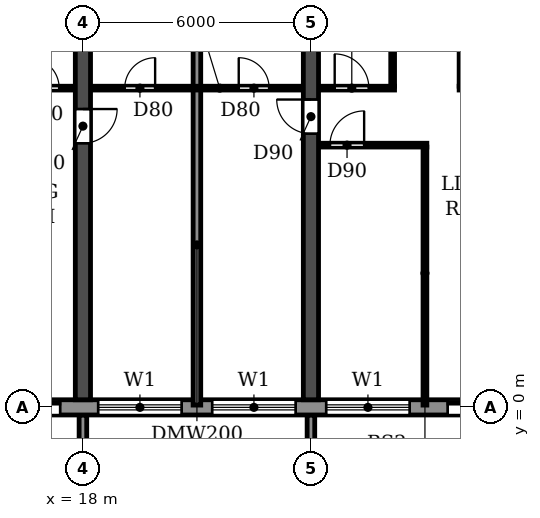
"""IFC4 building model, lengths in metres.
Left out: names, types, materials, properties, quantities, classifications, styles, units other than length and angle.
Written with IfcOpenShell. Run it as: python <this file> out.ifc"""

import sys

from ifc_helpers import new_model, si_unit, direction, frame, frame_2d, origin, place, context, subcontext, project, spatial, polyline, rectangle, outline, extrude, source, transform, mapped, element, fill, save


model = new_model("IFC4")
c1 = context("Model", 3, precision=1e-05, world=origin(), true_north=direction((0.0, 1.0)))
c2 = subcontext(c1, "Body", "Model", "MODEL_VIEW")
j1 = project(units=[si_unit("LENGTHUNIT", "METRE"), si_unit("PLANEANGLEUNIT", "RADIAN")], contexts=[c1])
p1 = place(None, origin())
s1 = spatial("IfcSite", under=j1, at=p1, CompositionType="ELEMENT")
p2 = place(p1, origin())
s2 = spatial("IfcBuilding", under=s1, at=p2, CompositionType="ELEMENT")
p3 = place(p2, frame((0.0, 0.0, 63.0)))
s3 = spatial("IfcBuildingStorey", under=s2, at=p3, CompositionType="ELEMENT", Elevation=63.0)
p4 = place(p3, frame((18.0, 0.2, 0.0), z_axis=(0.0, 0.0, 1.0), x_axis=(0.0, 1.0, 0.0)))
e1 = element("IfcWall", 1, at=p4, inside=s3, PredefinedType="SHEAR", context=c2, shape_type="SweptSolid", body=[
    extrude(rectangle(XDim=11.65, YDim=0.4, at=frame_2d((5.825, 0.0))), origin(), (0.0, 0.0, 1.0), 2.95),
])
p5 = place(p4, frame((6.75, 0.0, 0.0)))
e2 = element("IfcOpeningElement", 2, at=p5, cuts=e1, PredefinedType="OPENING", context=c2, shape_type="SweptSolid", body=[
    extrude(rectangle(XDim=0.9, YDim=2.1, at=frame_2d((0.45, 1.05))), frame((0.0, 0.21, 0.0), z_axis=(0.0, -1.0, 0.0), x_axis=(1.0, 0.0, 0.0)), (0.0, 0.0, 1.0), 0.42),
])
p6 = place(p3, frame((24.0, 0.2, 0.0), z_axis=(0.0, 0.0, 1.0), x_axis=(0.0, 1.0, 0.0)))
e3 = element("IfcWall", 3, at=p6, inside=s3, PredefinedType="SHEAR", context=c2, shape_type="SweptSolid", body=[
    extrude(rectangle(XDim=11.65, YDim=0.4, at=frame_2d((5.825, 0.0))), origin(), (0.0, 0.0, 1.0), 2.95),
])
p7 = place(p6, frame((7.0, 0.0, 0.0)))
e4 = element("IfcOpeningElement", 4, at=p7, cuts=e3, PredefinedType="OPENING", context=c2, shape_type="SweptSolid", body=[
    extrude(rectangle(XDim=0.9, YDim=2.1, at=frame_2d((0.45, 1.05))), frame((0.0, 0.21, 0.0), z_axis=(0.0, -1.0, 0.0), x_axis=(1.0, 0.0, 0.0)), (0.0, 0.0, 1.0), 0.42),
])
p8 = place(p3, frame((10.683, 0.0, 0.0), z_axis=(0.0, 0.0, 1.0), x_axis=(1.0, 0.0, 0.0)))
e5 = element("IfcWall", 5, at=p8, inside=s3, PredefinedType="STANDARD", context=c2, shape_type="SweptSolid", body=[
    extrude(rectangle(XDim=80.634, YDim=0.4, at=frame_2d((40.317, 0.0))), origin(), (0.0, 0.0, 1.0), 2.95),
])
p9 = place(p8, frame((1.717, 0.0, 0.9)))
e6 = element("IfcOpeningElement", 6, at=p9, cuts=e5, PredefinedType="OPENING", context=c2, shape_type="SweptSolid", body=[
    extrude(rectangle(XDim=2.2, YDim=1.5, at=frame_2d((1.1, 0.75))), frame((0.0, 0.21, 0.0), z_axis=(0.0, -1.0, 0.0), x_axis=(1.0, 0.0, 0.0)), (0.0, 0.0, 1.0), 0.42),
])
p10 = place(p8, frame((4.917, 0.0, 0.0)))
e7 = element("IfcOpeningElement", 7, at=p10, cuts=e5, PredefinedType="OPENING", context=c2, shape_type="SweptSolid", body=[
    extrude(rectangle(XDim=1.8, YDim=2.4, at=frame_2d((0.9, 1.2))), frame((0.0, 0.21, 0.0), z_axis=(0.0, -1.0, 0.0), x_axis=(1.0, 0.0, 0.0)), (0.0, 0.0, 1.0), 0.42),
])
p11 = place(p8, frame((7.717, 0.0, 0.9)))
e8 = element("IfcOpeningElement", 8, at=p11, cuts=e5, PredefinedType="OPENING", context=c2, shape_type="SweptSolid", body=[
    extrude(rectangle(XDim=2.2, YDim=1.5, at=frame_2d((1.1, 0.75))), frame((0.0, 0.21, 0.0), z_axis=(0.0, -1.0, 0.0), x_axis=(1.0, 0.0, 0.0)), (0.0, 0.0, 1.0), 0.42),
])
p12 = place(p8, frame((10.717, 0.0, 0.9)))
e9 = element("IfcOpeningElement", 9, at=p12, cuts=e5, PredefinedType="OPENING", context=c2, shape_type="SweptSolid", body=[
    extrude(rectangle(XDim=2.2, YDim=1.5, at=frame_2d((1.1, 0.75))), frame((0.0, 0.21, 0.0), z_axis=(0.0, -1.0, 0.0), x_axis=(1.0, 0.0, 0.0)), (0.0, 0.0, 1.0), 0.42),
])
p13 = place(p8, frame((13.717, 0.0, 0.9)))
e10 = element("IfcOpeningElement", 10, at=p13, cuts=e5, PredefinedType="OPENING", context=c2, shape_type="SweptSolid", body=[
    extrude(rectangle(XDim=2.2, YDim=1.5, at=frame_2d((1.1, 0.75))), frame((0.0, 0.21, 0.0), z_axis=(0.0, -1.0, 0.0), x_axis=(1.0, 0.0, 0.0)), (0.0, 0.0, 1.0), 0.42),
])
p14 = place(p8, frame((16.917, 0.0, 0.0)))
e11 = element("IfcOpeningElement", 11, at=p14, cuts=e5, PredefinedType="OPENING", context=c2, shape_type="SweptSolid", body=[
    extrude(rectangle(XDim=1.8, YDim=2.4, at=frame_2d((0.9, 1.2))), frame((0.0, 0.21, 0.0), z_axis=(0.0, -1.0, 0.0), x_axis=(1.0, 0.0, 0.0)), (0.0, 0.0, 1.0), 0.42),
])
p15 = place(p8, frame((19.717, 0.0, 0.9)))
e12 = element("IfcOpeningElement", 12, at=p15, cuts=e5, PredefinedType="OPENING", context=c2, shape_type="SweptSolid", body=[
    extrude(rectangle(XDim=2.2, YDim=1.5, at=frame_2d((1.1, 0.75))), frame((0.0, 0.21, 0.0), z_axis=(0.0, -1.0, 0.0), x_axis=(1.0, 0.0, 0.0)), (0.0, 0.0, 1.0), 0.42),
])
p16 = place(p8, frame((22.717, 0.0, 0.9)))
e13 = element("IfcOpeningElement", 13, at=p16, cuts=e5, PredefinedType="OPENING", context=c2, shape_type="SweptSolid", body=[
    extrude(rectangle(XDim=2.2, YDim=1.5, at=frame_2d((1.1, 0.75))), frame((0.0, 0.21, 0.0), z_axis=(0.0, -1.0, 0.0), x_axis=(1.0, 0.0, 0.0)), (0.0, 0.0, 1.0), 0.42),
])
p17 = place(p8, frame((25.917, 0.0, 0.0)))
e14 = element("IfcOpeningElement", 14, at=p17, cuts=e5, PredefinedType="OPENING", context=c2, shape_type="SweptSolid", body=[
    extrude(rectangle(XDim=1.8, YDim=2.4, at=frame_2d((0.9, 1.2))), frame((0.0, 0.21, 0.0), z_axis=(0.0, -1.0, 0.0), x_axis=(1.0, 0.0, 0.0)), (0.0, 0.0, 1.0), 0.42),
])
p18 = place(p8, frame((28.717, 0.0, 0.9)))
e15 = element("IfcOpeningElement", 15, at=p18, cuts=e5, PredefinedType="OPENING", context=c2, shape_type="SweptSolid", body=[
    extrude(rectangle(XDim=2.2, YDim=1.5, at=frame_2d((1.1, 0.75))), frame((0.0, 0.21, 0.0), z_axis=(0.0, -1.0, 0.0), x_axis=(1.0, 0.0, 0.0)), (0.0, 0.0, 1.0), 0.42),
])
p19 = place(p8, frame((31.717, 0.0, 0.9)))
e16 = element("IfcOpeningElement", 16, at=p19, cuts=e5, PredefinedType="OPENING", context=c2, shape_type="SweptSolid", body=[
    extrude(rectangle(XDim=2.2, YDim=1.5, at=frame_2d((1.1, 0.75))), frame((0.0, 0.21, 0.0), z_axis=(0.0, -1.0, 0.0), x_axis=(1.0, 0.0, 0.0)), (0.0, 0.0, 1.0), 0.42),
])
p20 = place(p8, frame((34.717, 0.0, 0.9)))
e17 = element("IfcOpeningElement", 17, at=p20, cuts=e5, PredefinedType="OPENING", context=c2, shape_type="SweptSolid", body=[
    extrude(rectangle(XDim=2.2, YDim=1.5, at=frame_2d((1.1, 0.75))), frame((0.0, 0.21, 0.0), z_axis=(0.0, -1.0, 0.0), x_axis=(1.0, 0.0, 0.0)), (0.0, 0.0, 1.0), 0.42),
])
p21 = place(p8, frame((37.717, 0.0, 0.9)))
e18 = element("IfcOpeningElement", 18, at=p21, cuts=e5, PredefinedType="OPENING", context=c2, shape_type="SweptSolid", body=[
    extrude(rectangle(XDim=2.2, YDim=1.5, at=frame_2d((1.1, 0.75))), frame((0.0, 0.21, 0.0), z_axis=(0.0, -1.0, 0.0), x_axis=(1.0, 0.0, 0.0)), (0.0, 0.0, 1.0), 0.42),
])
p22 = place(p8, frame((40.917, 0.0, 0.0)))
e19 = element("IfcOpeningElement", 19, at=p22, cuts=e5, PredefinedType="OPENING", context=c2, shape_type="SweptSolid", body=[
    extrude(rectangle(XDim=1.8, YDim=2.4, at=frame_2d((0.9, 1.2))), frame((0.0, 0.21, 0.0), z_axis=(0.0, -1.0, 0.0), x_axis=(1.0, 0.0, 0.0)), (0.0, 0.0, 1.0), 0.42),
])
p23 = place(p8, frame((43.717, 0.0, 0.9)))
e20 = element("IfcOpeningElement", 20, at=p23, cuts=e5, PredefinedType="OPENING", context=c2, shape_type="SweptSolid", body=[
    extrude(rectangle(XDim=2.2, YDim=1.5, at=frame_2d((1.1, 0.75))), frame((0.0, 0.21, 0.0), z_axis=(0.0, -1.0, 0.0), x_axis=(1.0, 0.0, 0.0)), (0.0, 0.0, 1.0), 0.42),
])
p24 = place(p8, frame((46.717, 0.0, 0.9)))
e21 = element("IfcOpeningElement", 21, at=p24, cuts=e5, PredefinedType="OPENING", context=c2, shape_type="SweptSolid", body=[
    extrude(rectangle(XDim=2.2, YDim=1.5, at=frame_2d((1.1, 0.75))), frame((0.0, 0.21, 0.0), z_axis=(0.0, -1.0, 0.0), x_axis=(1.0, 0.0, 0.0)), (0.0, 0.0, 1.0), 0.42),
])
p25 = place(p8, frame((49.717, 0.0, 0.9)))
e22 = element("IfcOpeningElement", 22, at=p25, cuts=e5, PredefinedType="OPENING", context=c2, shape_type="SweptSolid", body=[
    extrude(rectangle(XDim=2.2, YDim=1.5, at=frame_2d((1.1, 0.75))), frame((0.0, 0.21, 0.0), z_axis=(0.0, -1.0, 0.0), x_axis=(1.0, 0.0, 0.0)), (0.0, 0.0, 1.0), 0.42),
])
p26 = place(p8, frame((52.717, 0.0, 0.9)))
e23 = element("IfcOpeningElement", 23, at=p26, cuts=e5, PredefinedType="OPENING", context=c2, shape_type="SweptSolid", body=[
    extrude(rectangle(XDim=2.2, YDim=1.5, at=frame_2d((1.1, 0.75))), frame((0.0, 0.21, 0.0), z_axis=(0.0, -1.0, 0.0), x_axis=(1.0, 0.0, 0.0)), (0.0, 0.0, 1.0), 0.42),
])
p27 = place(p8, frame((55.717, 0.0, 0.9)))
e24 = element("IfcOpeningElement", 24, at=p27, cuts=e5, PredefinedType="OPENING", context=c2, shape_type="SweptSolid", body=[
    extrude(rectangle(XDim=2.2, YDim=1.5, at=frame_2d((1.1, 0.75))), frame((0.0, 0.21, 0.0), z_axis=(0.0, -1.0, 0.0), x_axis=(1.0, 0.0, 0.0)), (0.0, 0.0, 1.0), 0.42),
])
p28 = place(p8, frame((58.717, 0.0, 0.9)))
e25 = element("IfcOpeningElement", 25, at=p28, cuts=e5, PredefinedType="OPENING", context=c2, shape_type="SweptSolid", body=[
    extrude(rectangle(XDim=2.2, YDim=1.5, at=frame_2d((1.1, 0.75))), frame((0.0, 0.21, 0.0), z_axis=(0.0, -1.0, 0.0), x_axis=(1.0, 0.0, 0.0)), (0.0, 0.0, 1.0), 0.42),
])
p29 = place(p8, frame((61.717, 0.0, 0.9)))
e26 = element("IfcOpeningElement", 26, at=p29, cuts=e5, PredefinedType="OPENING", context=c2, shape_type="SweptSolid", body=[
    extrude(rectangle(XDim=2.2, YDim=1.5, at=frame_2d((1.1, 0.75))), frame((0.0, 0.21, 0.0), z_axis=(0.0, -1.0, 0.0), x_axis=(1.0, 0.0, 0.0)), (0.0, 0.0, 1.0), 0.42),
])
p30 = place(p8, frame((64.917, 0.0, 0.0)))
e27 = element("IfcOpeningElement", 27, at=p30, cuts=e5, PredefinedType="OPENING", context=c2, shape_type="SweptSolid", body=[
    extrude(rectangle(XDim=1.8, YDim=2.4, at=frame_2d((0.9, 1.2))), frame((0.0, 0.21, 0.0), z_axis=(0.0, -1.0, 0.0), x_axis=(1.0, 0.0, 0.0)), (0.0, 0.0, 1.0), 0.42),
])
p31 = place(p8, frame((67.717, 0.0, 0.9)))
e28 = element("IfcOpeningElement", 28, at=p31, cuts=e5, PredefinedType="OPENING", context=c2, shape_type="SweptSolid", body=[
    extrude(rectangle(XDim=2.2, YDim=1.5, at=frame_2d((1.1, 0.75))), frame((0.0, 0.21, 0.0), z_axis=(0.0, -1.0, 0.0), x_axis=(1.0, 0.0, 0.0)), (0.0, 0.0, 1.0), 0.42),
])
p32 = place(p8, frame((70.717, 0.0, 0.9)))
e29 = element("IfcOpeningElement", 29, at=p32, cuts=e5, PredefinedType="OPENING", context=c2, shape_type="SweptSolid", body=[
    extrude(rectangle(XDim=2.2, YDim=1.5, at=frame_2d((1.1, 0.75))), frame((0.0, 0.21, 0.0), z_axis=(0.0, -1.0, 0.0), x_axis=(1.0, 0.0, 0.0)), (0.0, 0.0, 1.0), 0.42),
])
p33 = place(p8, frame((73.717, 0.0, 0.9)))
e30 = element("IfcOpeningElement", 30, at=p33, cuts=e5, PredefinedType="OPENING", context=c2, shape_type="SweptSolid", body=[
    extrude(rectangle(XDim=2.2, YDim=1.5, at=frame_2d((1.1, 0.75))), frame((0.0, 0.21, 0.0), z_axis=(0.0, -1.0, 0.0), x_axis=(1.0, 0.0, 0.0)), (0.0, 0.0, 1.0), 0.42),
])
p34 = place(p8, frame((76.917, 0.0, 0.0)))
e31 = element("IfcOpeningElement", 31, at=p34, cuts=e5, PredefinedType="OPENING", context=c2, shape_type="SweptSolid", body=[
    extrude(rectangle(XDim=1.8, YDim=2.4, at=frame_2d((0.9, 1.2))), frame((0.0, 0.21, 0.0), z_axis=(0.0, -1.0, 0.0), x_axis=(1.0, 0.0, 0.0)), (0.0, 0.0, 1.0), 0.42),
])
m1 = source(origin(), c2, "Body", "SweptSolid", [
    extrude(outline(polyline([(0.0, 0.0), (0.2, 0.0), (0.2, 1.65), (0.0, 1.65), (0.0, 0.0)])), origin(), (0.0, 0.0, 1.0), 3.1),
])
for number, where in (
    (32, (17.9, -1.85, 0.0)),
    (33, (23.9, -1.85, 0.0)),
):
    element("IfcWall", number, at=place(p3, frame(where)), inside=s3, PredefinedType="STANDARD", context=c2, shape_type="MappedRepresentation", body=[
        mapped(m1, transform((0.0, 0.0, 0.0))),
    ])
p35 = place(p3, frame((21.0, 0.06, 0.0), z_axis=(0.0, 0.0, 1.0), x_axis=(0.0, 1.0, 0.0)))
e34 = element("IfcWall", 34, at=p35, inside=s3, PredefinedType="PARTITIONING", context=c2, shape_type="SweptSolid", body=[
    extrude(rectangle(XDim=11.78, YDim=0.2, at=frame_2d((5.89, 0.0))), origin(), (0.0, 0.0, 1.0), 2.95),
])
p36 = place(p3, frame((24.21, 6.9, 0.0), z_axis=(0.0, 0.0, 1.0), x_axis=(1.0, 0.0, 0.0)))
e35 = element("IfcWall", 35, at=p36, inside=s3, PredefinedType="PARTITIONING", context=c2, shape_type="SweptSolid", body=[
    extrude(rectangle(XDim=2.84, YDim=0.1, at=frame_2d((1.42, 0.0))), origin(), (0.0, 0.0, 1.0), 2.95),
])
p37 = place(p36, frame((0.29, 0.0, 0.0)))
e36 = element("IfcOpeningElement", 36, at=p37, cuts=e35, PredefinedType="OPENING", context=c2, shape_type="SweptSolid", body=[
    extrude(rectangle(XDim=0.9, YDim=2.1, at=frame_2d((0.45, 1.05))), frame((0.0, 0.06, 0.0), z_axis=(0.0, -1.0, 0.0), x_axis=(1.0, 0.0, 0.0)), (0.0, 0.0, 1.0), 0.12),
])
p38 = place(p3, frame((15.9, 8.4, 0.0), z_axis=(0.0, 0.0, 1.0), x_axis=(1.0, 0.0, 0.0)))
e37 = element("IfcWall", 37, at=p38, inside=s3, PredefinedType="PARTITIONING", context=c2, shape_type="SweptSolid", body=[
    extrude(rectangle(XDim=1.89, YDim=0.1, at=frame_2d((0.945, 0.0))), origin(), (0.0, 0.0, 1.0), 2.95),
])
p39 = place(p38, frame((0.675, 0.0, 0.0)))
e38 = element("IfcOpeningElement", 38, at=p39, cuts=e37, PredefinedType="OPENING", context=c2, shape_type="SweptSolid", body=[
    extrude(rectangle(XDim=0.8, YDim=2.1, at=frame_2d((0.4, 1.05))), frame((0.0, 0.06, 0.0), z_axis=(0.0, -1.0, 0.0), x_axis=(1.0, 0.0, 0.0)), (0.0, 0.0, 1.0), 0.12),
])
p40 = place(p3, frame((18.21, 8.4, 0.0), z_axis=(0.0, 0.0, 1.0), x_axis=(1.0, 0.0, 0.0)))
e39 = element("IfcWall", 39, at=p40, inside=s3, PredefinedType="PARTITIONING", context=c2, shape_type="SweptSolid", body=[
    extrude(rectangle(XDim=5.58, YDim=0.1, at=frame_2d((2.79, 0.0))), origin(), (0.0, 0.0, 1.0), 2.95),
])
p41 = place(p40, frame((0.89, 0.0, 0.0)))
e40 = element("IfcOpeningElement", 40, at=p41, cuts=e39, PredefinedType="OPENING", context=c2, shape_type="SweptSolid", body=[
    extrude(rectangle(XDim=0.8, YDim=2.1, at=frame_2d((0.4, 1.05))), frame((0.0, 0.06, 0.0), z_axis=(0.0, -1.0, 0.0), x_axis=(1.0, 0.0, 0.0)), (0.0, 0.0, 1.0), 0.12),
])
p42 = place(p40, frame((3.89, 0.0, 0.0)))
e41 = element("IfcOpeningElement", 41, at=p42, cuts=e39, PredefinedType="OPENING", context=c2, shape_type="SweptSolid", body=[
    extrude(rectangle(XDim=0.8, YDim=2.1, at=frame_2d((0.4, 1.05))), frame((0.0, 0.06, 0.0), z_axis=(0.0, -1.0, 0.0), x_axis=(1.0, 0.0, 0.0)), (0.0, 0.0, 1.0), 0.12),
])
p43 = place(p3, frame((24.21, 8.4, 0.0), z_axis=(0.0, 0.0, 1.0), x_axis=(1.0, 0.0, 0.0)))
e42 = element("IfcWall", 42, at=p43, inside=s3, PredefinedType="PARTITIONING", context=c2, shape_type="SweptSolid", body=[
    extrude(rectangle(XDim=1.99, YDim=0.1, at=frame_2d((0.995, 0.0))), origin(), (0.0, 0.0, 1.0), 2.95),
])
p44 = place(p43, frame((0.415, 0.0, 0.0)))
e43 = element("IfcOpeningElement", 43, at=p44, cuts=e42, PredefinedType="OPENING", context=c2, shape_type="SweptSolid", body=[
    extrude(rectangle(XDim=0.9, YDim=2.1, at=frame_2d((0.45, 1.05))), frame((0.0, 0.06, 0.0), z_axis=(0.0, -1.0, 0.0), x_axis=(1.0, 0.0, 0.0)), (0.0, 0.0, 1.0), 0.12),
])
p45 = place(p3, frame((27.9, 8.4, 0.0), z_axis=(0.0, 0.0, 1.0), x_axis=(1.0, 0.0, 0.0)))
e44 = element("IfcWall", 44, at=p45, inside=s3, PredefinedType="PARTITIONING", context=c2, shape_type="SweptSolid", body=[
    extrude(rectangle(XDim=1.89, YDim=0.1, at=frame_2d((0.945, 0.0))), origin(), (0.0, 0.0, 1.0), 2.95),
])
p46 = place(p45, frame((0.675, 0.0, 0.0)))
e45 = element("IfcOpeningElement", 45, at=p46, cuts=e44, PredefinedType="OPENING", context=c2, shape_type="SweptSolid", body=[
    extrude(rectangle(XDim=0.8, YDim=2.1, at=frame_2d((0.4, 1.05))), frame((0.0, 0.06, 0.0), z_axis=(0.0, -1.0, 0.0), x_axis=(1.0, 0.0, 0.0)), (0.0, 0.0, 1.0), 0.12),
])
p47 = place(p3, frame((26.15, 8.45, 0.0), z_axis=(0.0, 0.0, 1.0), x_axis=(0.0, 1.0, 0.0)))
e46 = element("IfcWall", 46, at=p47, inside=s3, PredefinedType="PARTITIONING", context=c2, shape_type="SweptSolid", body=[
    extrude(rectangle(XDim=3.39, YDim=0.1, at=frame_2d((1.695, 0.0))), origin(), (0.0, 0.0, 1.0), 2.95),
])
p48 = place(p3, frame((27.0, 0.06, 0.0), z_axis=(0.0, 0.0, 1.0), x_axis=(0.0, 1.0, 0.0)))
e47 = element("IfcWall", 47, at=p48, inside=s3, PredefinedType="PARTITIONING", context=c2, shape_type="SweptSolid", body=[
    extrude(rectangle(XDim=6.79, YDim=0.1, at=frame_2d((3.395, 0.0))), origin(), (0.0, 0.0, 1.0), 2.95),
])
p49 = place(p3, frame((27.95, 8.45, 0.0), z_axis=(0.0, 0.0, 1.0), x_axis=(0.0, 1.0, 0.0)))
e48 = element("IfcWall", 48, at=p49, inside=s3, PredefinedType="PARTITIONING", context=c2, shape_type="SweptSolid", body=[
    extrude(rectangle(XDim=3.39, YDim=0.1, at=frame_2d((1.695, 0.0))), origin(), (0.0, 0.0, 1.0), 2.95),
])
p50 = place(p10, origin())
e49 = element("IfcDoor", 49, at=p50, inside=s3, OperationType="DOUBLE_DOOR_SLIDING", PredefinedType="DOOR", context=c2, shape_type="SweptSolid", body=[
    extrude(rectangle(XDim=1.8, YDim=2.4, at=frame_2d((0.9, 1.2))), frame((0.0, 0.025, 0.0), z_axis=(0.0, -1.0, 0.0), x_axis=(1.0, 0.0, 0.0)), (0.0, 0.0, 1.0), 0.05),
])
fill(e7, e49)
p51 = place(p11, origin())
e50 = element("IfcWindow", 50, at=p51, inside=s3, PartitioningType="DOUBLE_PANEL_HORIZONTAL", PredefinedType="WINDOW", context=c2, shape_type="SweptSolid", body=[
    extrude(rectangle(XDim=2.2, YDim=1.5, at=frame_2d((1.1, 0.75))), frame((0.0, 0.03, 0.0), z_axis=(0.0, -1.0, 0.0), x_axis=(1.0, 0.0, 0.0)), (0.0, 0.0, 1.0), 0.06),
])
fill(e8, e50)
p52 = place(p12, origin())
e51 = element("IfcWindow", 51, at=p52, inside=s3, PartitioningType="DOUBLE_PANEL_HORIZONTAL", PredefinedType="WINDOW", context=c2, shape_type="SweptSolid", body=[
    extrude(rectangle(XDim=2.2, YDim=1.5, at=frame_2d((1.1, 0.75))), frame((0.0, 0.03, 0.0), z_axis=(0.0, -1.0, 0.0), x_axis=(1.0, 0.0, 0.0)), (0.0, 0.0, 1.0), 0.06),
])
fill(e9, e51)
p53 = place(p13, origin())
e52 = element("IfcWindow", 52, at=p53, inside=s3, PartitioningType="DOUBLE_PANEL_HORIZONTAL", PredefinedType="WINDOW", context=c2, shape_type="SweptSolid", body=[
    extrude(rectangle(XDim=2.2, YDim=1.5, at=frame_2d((1.1, 0.75))), frame((0.0, 0.03, 0.0), z_axis=(0.0, -1.0, 0.0), x_axis=(1.0, 0.0, 0.0)), (0.0, 0.0, 1.0), 0.06),
])
fill(e10, e52)
p54 = place(p14, origin())
e53 = element("IfcDoor", 53, at=p54, inside=s3, OperationType="DOUBLE_DOOR_SLIDING", PredefinedType="DOOR", context=c2, shape_type="SweptSolid", body=[
    extrude(rectangle(XDim=1.8, YDim=2.4, at=frame_2d((0.9, 1.2))), frame((0.0, 0.025, 0.0), z_axis=(0.0, -1.0, 0.0), x_axis=(1.0, 0.0, 0.0)), (0.0, 0.0, 1.0), 0.05),
])
fill(e11, e53)
p55 = place(p41, origin())
e54 = element("IfcDoor", 54, at=p55, inside=s3, OperationType="SINGLE_SWING_RIGHT", PredefinedType="DOOR", context=c2, shape_type="SweptSolid", body=[
    extrude(rectangle(XDim=0.8, YDim=2.1, at=frame_2d((0.4, 1.05))), frame((0.0, 0.025, 0.0), z_axis=(0.0, -1.0, 0.0), x_axis=(1.0, 0.0, 0.0)), (0.0, 0.0, 1.0), 0.05),
])
fill(e40, e54)
p56 = place(p39, origin())
e55 = element("IfcDoor", 55, at=p56, inside=s3, OperationType="SINGLE_SWING_LEFT", PredefinedType="DOOR", context=c2, shape_type="SweptSolid", body=[
    extrude(rectangle(XDim=0.8, YDim=2.1, at=frame_2d((0.4, 1.05))), frame((0.0, 0.025, 0.0), z_axis=(0.0, -1.0, 0.0), x_axis=(1.0, 0.0, 0.0)), (0.0, 0.0, 1.0), 0.05),
])
fill(e38, e55)
p57 = place(p5, frame((0.9, 0.0, 0.0), z_axis=(0.0, 0.0, 1.0), x_axis=(-1.0, 0.0, 0.0)))
e56 = element("IfcDoor", 56, at=p57, inside=s3, OperationType="SINGLE_SWING_LEFT", PredefinedType="DOOR", context=c2, shape_type="SweptSolid", body=[
    extrude(rectangle(XDim=0.9, YDim=2.1, at=frame_2d((0.45, 1.05))), frame((0.0, 0.025, 0.0), z_axis=(0.0, -1.0, 0.0), x_axis=(1.0, 0.0, 0.0)), (0.0, 0.0, 1.0), 0.05),
])
fill(e2, e56)
p58 = place(p42, origin())
e57 = element("IfcDoor", 57, at=p58, inside=s3, OperationType="SINGLE_SWING_LEFT", PredefinedType="DOOR", context=c2, shape_type="SweptSolid", body=[
    extrude(rectangle(XDim=0.8, YDim=2.1, at=frame_2d((0.4, 1.05))), frame((0.0, 0.025, 0.0), z_axis=(0.0, -1.0, 0.0), x_axis=(1.0, 0.0, 0.0)), (0.0, 0.0, 1.0), 0.05),
])
fill(e41, e57)
p59 = place(p7, origin())
e58 = element("IfcDoor", 58, at=p59, inside=s3, OperationType="SINGLE_SWING_RIGHT", PredefinedType="DOOR", context=c2, shape_type="SweptSolid", body=[
    extrude(rectangle(XDim=0.9, YDim=2.1, at=frame_2d((0.45, 1.05))), frame((0.0, 0.025, 0.0), z_axis=(0.0, -1.0, 0.0), x_axis=(1.0, 0.0, 0.0)), (0.0, 0.0, 1.0), 0.05),
])
fill(e4, e58)
p60 = place(p37, origin())
e59 = element("IfcDoor", 59, at=p60, inside=s3, OperationType="SINGLE_SWING_RIGHT", PredefinedType="DOOR", context=c2, shape_type="SweptSolid", body=[
    extrude(rectangle(XDim=0.9, YDim=2.1, at=frame_2d((0.45, 1.05))), frame((0.0, 0.025, 0.0), z_axis=(0.0, -1.0, 0.0), x_axis=(1.0, 0.0, 0.0)), (0.0, 0.0, 1.0), 0.05),
])
fill(e36, e59)
p61 = place(p44, origin())
e60 = element("IfcDoor", 60, at=p61, inside=s3, OperationType="SINGLE_SWING_LEFT", PredefinedType="DOOR", context=c2, shape_type="SweptSolid", body=[
    extrude(rectangle(XDim=0.9, YDim=2.1, at=frame_2d((0.45, 1.05))), frame((0.0, 0.025, 0.0), z_axis=(0.0, -1.0, 0.0), x_axis=(1.0, 0.0, 0.0)), (0.0, 0.0, 1.0), 0.05),
])
fill(e43, e60)
save(model, sys.argv[1])
